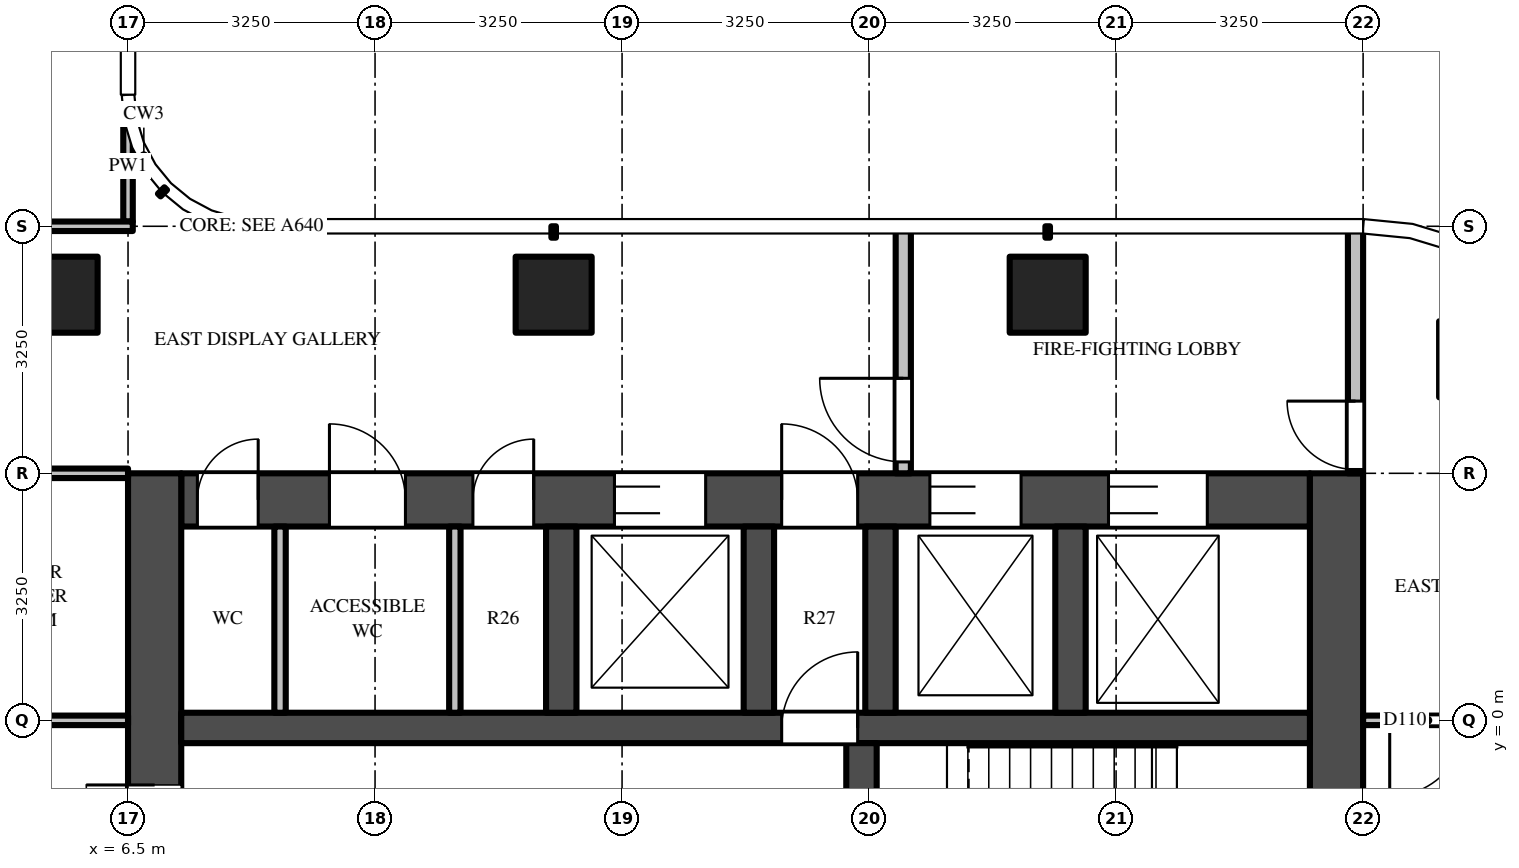
"""IFC4 building model, lengths in metres.
Left out: names, types, materials, properties, quantities, classifications, styles, units other than length and angle.
Written with IfcOpenShell. Run it as: python <this file> out.ifc"""

import sys

from ifc_helpers import new_model, si_unit, direction, frame, frame_2d, origin, origin_2d, place, context, subcontext, project, spatial, rectangle, extrude, source, transform, mapped, element, fill, save


model = new_model("IFC4")
c1 = context("Model", 3, precision=1e-05, world=origin(), true_north=direction((0.0, 1.0)))
c2 = subcontext(c1, "Body", "Model", "MODEL_VIEW")
j1 = project(units=[si_unit("LENGTHUNIT", "METRE"), si_unit("PLANEANGLEUNIT", "RADIAN")], contexts=[c1])
p1 = place(None, origin())
s1 = spatial("IfcSite", under=j1, at=p1, CompositionType="ELEMENT")
p2 = place(p1, origin())
s2 = spatial("IfcBuilding", under=s1, at=p2, CompositionType="ELEMENT")
p3 = place(p2, frame((0.0, 0.0, 306.7)))
s3 = spatial("IfcBuildingStorey", under=s2, at=p3, CompositionType="ELEMENT", Elevation=306.7)
m1 = source(origin(), c2, "Body", "SweptSolid", [
    extrude(rectangle(XDim=1.0, YDim=1.0, at=origin_2d()), origin(), (0.0, 0.0, 1.0), 3.9),
])
for number, where, z_axis, x_axis in (
    (1, (12.1, 5.6, 0.0), (0.0, 0.0, 1.0), (1.0, 0.0, 0.0)),
    (2, (18.6, 5.6, 0.0), (0.0, 0.0, 1.0), (1.0, 0.0, 0.0)),
    (3, (5.6, 5.6, 0.0), (0.0, 0.0, 1.0), (1.0, 0.0, 0.0)),
):
    element("IfcColumn", number, at=place(p3, frame(where, z_axis=z_axis, x_axis=x_axis)), inside=s3, PredefinedType="COLUMN", context=c2, shape_type="MappedRepresentation", body=[
        mapped(m1, transform((0.0, 0.0, 0.0))),
    ])
m2 = source(origin(), c2, "Body", "SweptSolid", [
    extrude(rectangle(XDim=14.85, YDim=0.7, at=frame_2d((7.425, 0.0))), origin(), (0.0, 0.0, 1.0), 3.7),
])
p4 = place(p3, frame((7.2, 2.9, 0.0), z_axis=(0.0, 0.0, 1.0), x_axis=(1.0, 0.0, 0.0)))
e4 = element("IfcWall", 4, at=p4, inside=s3, PredefinedType="SHEAR", context=c2, shape_type="MappedRepresentation", body=[
    mapped(m2, transform((0.0, 0.0, 0.0))),
])
m3 = source(origin(), c2, "Body", "SweptSolid", [
    extrude(rectangle(XDim=1.2, YDim=2.1, at=frame_2d((0.6, 1.05))), frame((0.0, 0.36, 0.0), z_axis=(0.0, -1.0, 0.0), x_axis=(1.0, 0.0, 0.0)), (0.0, 0.0, 1.0), 0.72),
])
p5 = place(p4, frame((5.7, 0.0, 0.0)))
e5 = element("IfcOpeningElement", 5, at=p5, cuts=e4, PredefinedType="OPENING", context=c2, shape_type="MappedRepresentation", body=[
    mapped(m3, transform((0.0, 0.0, 0.0))),
])
m4 = source(origin(), c2, "Body", "SweptSolid", [
    extrude(rectangle(XDim=1.3, YDim=2.1, at=frame_2d((0.65, 1.05))), frame((0.0, 0.36, 0.0), z_axis=(0.0, -1.0, 0.0), x_axis=(1.0, 0.0, 0.0)), (0.0, 0.0, 1.0), 0.72),
])
p6 = place(p4, frame((12.2, 0.0, 0.0)))
e6 = element("IfcOpeningElement", 6, at=p6, cuts=e4, PredefinedType="OPENING", context=c2, shape_type="MappedRepresentation", body=[
    mapped(m4, transform((0.0, 0.0, 0.0))),
])
p7 = place(p4, frame((9.85, 0.0, 0.0)))
e7 = element("IfcOpeningElement", 7, at=p7, cuts=e4, PredefinedType="OPENING", context=c2, shape_type="MappedRepresentation", body=[
    mapped(m3, transform((0.0, 0.0, 0.0))),
])
m5 = source(origin(), c2, "Body", "SweptSolid", [
    extrude(rectangle(XDim=1.0, YDim=2.1, at=frame_2d((0.5, 1.05))), frame((0.0, 0.36, 0.0), z_axis=(0.0, -1.0, 0.0), x_axis=(1.0, 0.0, 0.0)), (0.0, 0.0, 1.0), 0.72),
])
p8 = place(p4, frame((7.9, 0.0, 0.0)))
e8 = element("IfcOpeningElement", 8, at=p8, cuts=e4, PredefinedType="OPENING", context=c2, shape_type="MappedRepresentation", body=[
    mapped(m5, transform((0.0, 0.0, 0.0))),
])
m6 = source(origin(), c2, "Body", "SweptSolid", [
    extrude(rectangle(XDim=0.8, YDim=2.1, at=frame_2d((0.4, 1.05))), frame((0.0, 0.36, 0.0), z_axis=(0.0, -1.0, 0.0), x_axis=(1.0, 0.0, 0.0)), (0.0, 0.0, 1.0), 0.72),
])
p9 = place(p4, frame((0.212, 0.0, 0.0)))
e9 = element("IfcOpeningElement", 9, at=p9, cuts=e4, PredefinedType="OPENING", context=c2, shape_type="MappedRepresentation", body=[
    mapped(m6, transform((0.0, 0.0, 0.0))),
])
p10 = place(p4, frame((1.95, 0.0, 0.0)))
e10 = element("IfcOpeningElement", 10, at=p10, cuts=e4, PredefinedType="OPENING", context=c2, shape_type="MappedRepresentation", body=[
    mapped(m5, transform((0.0, 0.0, 0.0))),
])
p11 = place(p4, frame((3.837, 0.0, 0.0)))
e11 = element("IfcOpeningElement", 11, at=p11, cuts=e4, PredefinedType="OPENING", context=c2, shape_type="MappedRepresentation", body=[
    mapped(m6, transform((0.0, 0.0, 0.0))),
])
m7 = source(origin(), c2, "Body", "SweptSolid", [
    extrude(rectangle(XDim=9.05, YDim=0.7, at=frame_2d((4.525, 0.0))), origin(), (0.0, 0.0, 1.0), 3.7),
])
p12 = place(p3, frame((6.85, -5.8, 0.0), z_axis=(0.0, 0.0, 1.0), x_axis=(0.0, 1.0, 0.0)))
e12 = element("IfcWall", 12, at=p12, inside=s3, PredefinedType="SHEAR", context=c2, shape_type="MappedRepresentation", body=[
    mapped(m7, transform((0.0, 0.0, 0.0))),
])
m8 = source(origin(), c2, "Body", "SweptSolid", [
    extrude(rectangle(XDim=1.8, YDim=2.1, at=frame_2d((0.9, 1.05))), frame((0.0, 0.36, 0.0), z_axis=(0.0, -1.0, 0.0), x_axis=(1.0, 0.0, 0.0)), (0.0, 0.0, 1.0), 0.72),
])
p13 = place(p12, frame((3.15, 0.0, 0.0)))
e13 = element("IfcOpeningElement", 13, at=p13, cuts=e12, PredefinedType="OPENING", context=c2, shape_type="MappedRepresentation", body=[
    mapped(m8, transform((0.0, 0.0, 0.0))),
])
p14 = place(p3, frame((22.4, -5.8, 0.0), z_axis=(0.0, 0.0, 1.0), x_axis=(0.0, 1.0, 0.0)))
e14 = element("IfcWall", 14, at=p14, inside=s3, PredefinedType="SHEAR", context=c2, shape_type="MappedRepresentation", body=[
    mapped(m7, transform((0.0, 0.0, 0.0))),
])
m9 = source(origin(), c2, "Body", "SweptSolid", [
    extrude(rectangle(XDim=14.85, YDim=0.4, at=frame_2d((7.425, 0.0))), origin(), (0.0, 0.0, 1.0), 3.7),
])
p15 = place(p3, frame((7.2, -0.1, 0.0), z_axis=(0.0, 0.0, 1.0), x_axis=(1.0, 0.0, 0.0)))
e15 = element("IfcWall", 15, at=p15, inside=s3, PredefinedType="SHEAR", context=c2, shape_type="MappedRepresentation", body=[
    mapped(m9, transform((0.0, 0.0, 0.0))),
])
m10 = source(origin(), c2, "Body", "SweptSolid", [
    extrude(rectangle(XDim=1.0, YDim=2.1, at=frame_2d((0.5, 1.05))), frame((0.0, 0.21, 0.0), z_axis=(0.0, -1.0, 0.0), x_axis=(1.0, 0.0, 0.0)), (0.0, 0.0, 1.0), 0.42),
])
p16 = place(p15, frame((7.9, 0.0, 0.0)))
e16 = element("IfcOpeningElement", 16, at=p16, cuts=e15, PredefinedType="OPENING", context=c2, shape_type="MappedRepresentation", body=[
    mapped(m10, transform((0.0, 0.0, 0.0))),
])
m11 = source(origin(), c2, "Body", "SweptSolid", [
    extrude(rectangle(XDim=5.5, YDim=0.4, at=frame_2d((2.75, 0.0))), origin(), (0.0, 0.0, 1.0), 3.7),
])
p17 = place(p3, frame((16.15, -5.8, 0.0), z_axis=(0.0, 0.0, 1.0), x_axis=(0.0, 1.0, 0.0)))
e17 = element("IfcWall", 17, at=p17, inside=s3, PredefinedType="SHEAR", context=c2, shape_type="MappedRepresentation", body=[
    mapped(m11, transform((0.0, 0.0, 0.0))),
])
m12 = source(origin(), c2, "Body", "SweptSolid", [
    extrude(rectangle(XDim=1.1, YDim=2.1, at=frame_2d((0.55, 1.05))), frame((0.0, 0.21, 0.0), z_axis=(0.0, -1.0, 0.0), x_axis=(1.0, 0.0, 0.0)), (0.0, 0.0, 1.0), 0.42),
])
p18 = place(p17, frame((0.725, 0.0, 0.0)))
e18 = element("IfcOpeningElement", 18, at=p18, cuts=e17, PredefinedType="OPENING", context=c2, shape_type="MappedRepresentation", body=[
    mapped(m12, transform((0.0, 0.0, 0.0))),
])
p19 = place(p17, frame((3.675, 0.0, 0.0)))
e19 = element("IfcOpeningElement", 19, at=p19, cuts=e17, PredefinedType="OPENING", context=c2, shape_type="MappedRepresentation", body=[
    mapped(m12, transform((0.0, 0.0, 0.0))),
])
m13 = source(origin(), c2, "Body", "SweptSolid", [
    extrude(rectangle(XDim=2.45, YDim=0.4, at=frame_2d((1.225, 0.0))), origin(), (0.0, 0.0, 1.0), 3.7),
])
for number, where, z_axis, x_axis in (
    (20, (12.2, 0.1, 0.0), (0.0, 0.0, 1.0), (0.0, 1.0, 0.0)),
    (21, (14.8, 0.1, 0.0), (0.0, 0.0, 1.0), (0.0, 1.0, 0.0)),
    (22, (16.4, 0.1, 0.0), (0.0, 0.0, 1.0), (0.0, 1.0, 0.0)),
    (23, (18.9, 0.1, 0.0), (0.0, 0.0, 1.0), (0.0, 1.0, 0.0)),
):
    element("IfcWall", number, at=place(p3, frame(where, z_axis=z_axis, x_axis=x_axis)), inside=s3, PredefinedType="SHEAR", context=c2, shape_type="MappedRepresentation", body=[
        mapped(m13, transform((0.0, 0.0, 0.0))),
    ])
m14 = source(origin(), c2, "Body", "SweptSolid", [
    extrude(rectangle(XDim=3.25, YDim=0.2, at=frame_2d((1.625, 0.0))), origin(), (0.0, 0.0, 1.0), 3.7),
])
p20 = place(p3, frame((16.7, 3.25, 0.0), z_axis=(0.0, 0.0, 1.0), x_axis=(0.0, 1.0, 0.0)))
e24 = element("IfcWall", 24, at=p20, inside=s3, PredefinedType="PARTITIONING", context=c2, shape_type="MappedRepresentation", body=[
    mapped(m14, transform((0.0, 0.0, 0.0))),
])
m15 = source(origin(), c2, "Body", "SweptSolid", [
    extrude(rectangle(XDim=1.1, YDim=2.1, at=frame_2d((0.55, 1.05))), frame((0.0, 0.11, 0.0), z_axis=(0.0, -1.0, 0.0), x_axis=(1.0, 0.0, 0.0)), (0.0, 0.0, 1.0), 0.22),
])
p21 = place(p20, frame((0.15, 0.0, 0.0)))
e25 = element("IfcOpeningElement", 25, at=p21, cuts=e24, PredefinedType="OPENING", context=c2, shape_type="MappedRepresentation", body=[
    mapped(m15, transform((0.0, 0.0, 0.0))),
])
p22 = place(p3, frame((22.65, 3.25, 0.0), z_axis=(0.0, 0.0, 1.0), x_axis=(0.0, 1.0, 0.0)))
e26 = element("IfcWall", 26, at=p22, inside=s3, PredefinedType="PARTITIONING", context=c2, shape_type="MappedRepresentation", body=[
    mapped(m14, transform((0.0, 0.0, 0.0))),
])
m16 = source(origin(), c2, "Body", "SweptSolid", [
    extrude(rectangle(XDim=0.9, YDim=2.1, at=frame_2d((0.45, 1.05))), frame((0.0, 0.11, 0.0), z_axis=(0.0, -1.0, 0.0), x_axis=(1.0, 0.0, 0.0)), (0.0, 0.0, 1.0), 0.22),
])
p23 = place(p22, frame((0.05, 0.0, 0.0)))
e27 = element("IfcOpeningElement", 27, at=p23, cuts=e26, PredefinedType="OPENING", context=c2, shape_type="MappedRepresentation", body=[
    mapped(m16, transform((0.0, 0.0, 0.0))),
])
m17 = source(origin(), c2, "Body", "SweptSolid", [
    extrude(rectangle(XDim=2.45, YDim=0.15, at=frame_2d((1.225, 0.0))), origin(), (0.0, 0.0, 1.0), 3.7),
])
for number, where, z_axis, x_axis in (
    (28, (8.5, 0.1, 0.0), (0.0, 0.0, 1.0), (0.0, 1.0, 0.0)),
    (29, (10.8, 0.1, 0.0), (0.0, 0.0, 1.0), (0.0, 1.0, 0.0)),
):
    element("IfcWall", number, at=place(p3, frame(where, z_axis=z_axis, x_axis=x_axis)), inside=s3, PredefinedType="PARTITIONING", context=c2, shape_type="MappedRepresentation", body=[
        mapped(m17, transform((0.0, 0.0, 0.0))),
    ])
m18 = source(origin(), c2, "Body", "SweptSolid", [
    extrude(rectangle(XDim=1.469, YDim=0.125, at=frame_2d((0.734, 0.0))), origin(), (0.0, 0.0, 1.0), 3.7),
])
p24 = place(p3, frame((6.5, 6.562, 0.0), z_axis=(0.0, 0.0, 1.0), x_axis=(0.0, 1.0, 0.0)))
e30 = element("IfcWall", 30, at=p24, inside=s3, PredefinedType="PARTITIONING", context=c2, shape_type="MappedRepresentation", body=[
    mapped(m18, transform((0.0, 0.0, 0.0))),
])
m19 = source(origin(), c2, "Body", "SweptSolid", [
    extrude(rectangle(XDim=5.363, YDim=0.125, at=frame_2d((2.681, 0.0))), origin(), (0.0, 0.0, 1.0), 2.997),
])
p25 = place(p3, frame((6.5, 0.0, 0.0), z_axis=(0.0, 0.0, 1.0), x_axis=(-1.0, 0.0, 0.0)))
e31 = element("IfcWall", 31, at=p25, inside=s3, PredefinedType="PARTITIONING", context=c2, shape_type="MappedRepresentation", body=[
    mapped(m19, transform((0.0, 0.0, 0.0))),
])
m20 = source(origin(), c2, "Body", "SweptSolid", [
    extrude(rectangle(XDim=1.0, YDim=2.1, at=frame_2d((0.5, 1.05))), frame((0.0, 0.073, 0.0), z_axis=(0.0, -1.0, 0.0), x_axis=(1.0, 0.0, 0.0)), (0.0, 0.0, 1.0), 0.145),
])
p26 = place(p25, frame((1.3, 0.0, 0.0)))
e32 = element("IfcOpeningElement", 32, at=p26, cuts=e31, PredefinedType="OPENING", context=c2, shape_type="MappedRepresentation", body=[
    mapped(m20, transform((0.0, 0.0, 0.0))),
])
m21 = source(origin(), c2, "Body", "SweptSolid", [
    extrude(rectangle(XDim=3.05, YDim=0.125, at=frame_2d((1.525, 0.0))), origin(), (0.0, 0.0, 1.0), 2.78),
])
p27 = place(p3, frame((25.8, 0.0, 0.0), z_axis=(0.0, 0.0, 1.0), x_axis=(-1.0, 0.0, 0.0)))
e33 = element("IfcWall", 33, at=p27, inside=s3, PredefinedType="PARTITIONING", context=c2, shape_type="MappedRepresentation", body=[
    mapped(m21, transform((0.0, 0.0, 0.0))),
])
p28 = place(p27, frame((1.7, 0.0, 0.0)))
e34 = element("IfcOpeningElement", 34, at=p28, cuts=e33, PredefinedType="OPENING", context=c2, shape_type="MappedRepresentation", body=[
    mapped(m20, transform((0.0, 0.0, 0.0))),
])
p29 = place(p3, frame((1.137, 3.25, 0.0), z_axis=(0.0, 0.0, 1.0), x_axis=(1.0, 0.0, 0.0)))
e35 = element("IfcWall", 35, at=p29, inside=s3, PredefinedType="PARTITIONING", context=c2, shape_type="MappedRepresentation", body=[
    mapped(m19, transform((0.0, 0.0, 0.0))),
])
m22 = source(origin(), c2, "Body", "SweptSolid", [
    extrude(rectangle(XDim=5.425, YDim=0.125, at=frame_2d((2.712, 0.0))), origin(), (0.0, 0.0, 1.0), 2.78),
])
p30 = place(p3, frame((1.137, 6.5, 0.0), z_axis=(0.0, 0.0, 1.0), x_axis=(1.0, 0.0, 0.0)))
e36 = element("IfcWall", 36, at=p30, inside=s3, PredefinedType="PARTITIONING", context=c2, shape_type="MappedRepresentation", body=[
    mapped(m22, transform((0.0, 0.0, 0.0))),
])
m23 = source(origin(), c2, "Body", "SweptSolid", [
    extrude(rectangle(XDim=1.2, YDim=2.1, at=frame_2d((0.6, 1.05))), frame((0.0, -0.275, 0.0), z_axis=(0.0, -1.0, 0.0), x_axis=(1.0, 0.0, 0.0)), (0.0, 0.0, 1.0), 0.05),
])
p31 = place(p5, origin())
e37 = element("IfcDoor", 37, at=p31, inside=s3, OperationType="DOUBLE_DOOR_SLIDING", PredefinedType="DOOR", context=c2, shape_type="MappedRepresentation", body=[
    mapped(m23, transform((0.0, 0.0, 0.0))),
])
fill(e5, e37)
m24 = source(origin(), c2, "Body", "SweptSolid", [
    extrude(rectangle(XDim=1.3, YDim=2.1, at=frame_2d((0.65, 1.05))), frame((0.0, -0.275, 0.0), z_axis=(0.0, -1.0, 0.0), x_axis=(1.0, 0.0, 0.0)), (0.0, 0.0, 1.0), 0.05),
])
p32 = place(p6, origin())
e38 = element("IfcDoor", 38, at=p32, inside=s3, OperationType="DOUBLE_DOOR_SLIDING", PredefinedType="DOOR", context=c2, shape_type="MappedRepresentation", body=[
    mapped(m24, transform((0.0, 0.0, 0.0))),
])
fill(e6, e38)
p33 = place(p7, origin())
e39 = element("IfcDoor", 39, at=p33, inside=s3, OperationType="DOUBLE_DOOR_SLIDING", PredefinedType="DOOR", context=c2, shape_type="MappedRepresentation", body=[
    mapped(m23, transform((0.0, 0.0, 0.0))),
])
fill(e7, e39)
m25 = source(origin(), c2, "Body", "SweptSolid", [
    extrude(rectangle(XDim=1.8, YDim=2.1, at=frame_2d((0.9, 1.05))), frame((0.0, -0.275, 0.0), z_axis=(0.0, -1.0, 0.0), x_axis=(1.0, 0.0, 0.0)), (0.0, 0.0, 1.0), 0.05),
])
p34 = place(p13, origin())
e40 = element("IfcDoor", 40, at=p34, inside=s3, OperationType="DOUBLE_DOOR_SINGLE_SWING", PredefinedType="DOOR", context=c2, shape_type="MappedRepresentation", body=[
    mapped(m25, transform((0.0, 0.0, 0.0))),
])
fill(e13, e40)
m26 = source(origin(), c2, "Body", "SweptSolid", [
    extrude(rectangle(XDim=1.0, YDim=2.1, at=frame_2d((0.5, 1.05))), frame((0.0, 0.025, 0.0), z_axis=(0.0, -1.0, 0.0), x_axis=(1.0, 0.0, 0.0)), (0.0, 0.0, 1.0), 0.05),
])
p35 = place(p16, origin())
e41 = element("IfcDoor", 41, at=p35, inside=s3, OperationType="SINGLE_SWING_RIGHT", PredefinedType="DOOR", context=c2, shape_type="MappedRepresentation", body=[
    mapped(m26, transform((0.0, 0.0, 0.0))),
])
fill(e16, e41)
m27 = source(origin(), c2, "Body", "SweptSolid", [
    extrude(rectangle(XDim=1.0, YDim=2.1, at=frame_2d((0.5, 1.05))), frame((0.0, -0.275, 0.0), z_axis=(0.0, -1.0, 0.0), x_axis=(1.0, 0.0, 0.0)), (0.0, 0.0, 1.0), 0.05),
])
p36 = place(p8, origin())
e42 = element("IfcDoor", 42, at=p36, inside=s3, OperationType="SINGLE_SWING_LEFT", PredefinedType="DOOR", context=c2, shape_type="MappedRepresentation", body=[
    mapped(m27, transform((0.0, 0.0, 0.0))),
])
fill(e8, e42)
m28 = source(origin(), c2, "Body", "SweptSolid", [
    extrude(rectangle(XDim=1.1, YDim=2.1, at=frame_2d((0.55, 1.05))), frame((0.0, 0.025, 0.0), z_axis=(0.0, -1.0, 0.0), x_axis=(1.0, 0.0, 0.0)), (0.0, 0.0, 1.0), 0.05),
])
p37 = place(p21, origin())
e43 = element("IfcDoor", 43, at=p37, inside=s3, OperationType="SINGLE_SWING_RIGHT", PredefinedType="DOOR", context=c2, shape_type="MappedRepresentation", body=[
    mapped(m28, transform((0.0, 0.0, 0.0))),
])
fill(e25, e43)
m29 = source(origin(), c2, "Body", "SweptSolid", [
    extrude(rectangle(XDim=0.9, YDim=2.1, at=frame_2d((0.45, 1.05))), frame((0.0, 0.025, 0.0), z_axis=(0.0, -1.0, 0.0), x_axis=(1.0, 0.0, 0.0)), (0.0, 0.0, 1.0), 0.05),
])
p38 = place(p23, origin())
e44 = element("IfcDoor", 44, at=p38, inside=s3, OperationType="SINGLE_SWING_RIGHT", PredefinedType="DOOR", context=c2, shape_type="MappedRepresentation", body=[
    mapped(m29, transform((0.0, 0.0, 0.0))),
])
fill(e27, e44)
m30 = source(origin(), c2, "Body", "SweptSolid", [
    extrude(rectangle(XDim=0.8, YDim=2.1, at=frame_2d((0.4, 1.05))), frame((0.0, -0.275, 0.0), z_axis=(0.0, -1.0, 0.0), x_axis=(1.0, 0.0, 0.0)), (0.0, 0.0, 1.0), 0.05),
])
p39 = place(p9, origin())
e45 = element("IfcDoor", 45, at=p39, inside=s3, OperationType="SINGLE_SWING_RIGHT", PredefinedType="DOOR", context=c2, shape_type="MappedRepresentation", body=[
    mapped(m30, transform((0.0, 0.0, 0.0))),
])
fill(e9, e45)
p40 = place(p10, origin())
e46 = element("IfcDoor", 46, at=p40, inside=s3, OperationType="SINGLE_SWING_LEFT", PredefinedType="DOOR", context=c2, shape_type="MappedRepresentation", body=[
    mapped(m27, transform((0.0, 0.0, 0.0))),
])
fill(e10, e46)
p41 = place(p11, origin())
e47 = element("IfcDoor", 47, at=p41, inside=s3, OperationType="SINGLE_SWING_RIGHT", PredefinedType="DOOR", context=c2, shape_type="MappedRepresentation", body=[
    mapped(m30, transform((0.0, 0.0, 0.0))),
])
fill(e11, e47)
p42 = place(p28, origin())
e48 = element("IfcDoor", 48, at=p42, inside=s3, OperationType="SINGLE_SWING_RIGHT", PredefinedType="DOOR", context=c2, shape_type="MappedRepresentation", body=[
    mapped(m26, transform((0.0, 0.0, 0.0))),
])
fill(e34, e48)
save(model, sys.argv[1])
